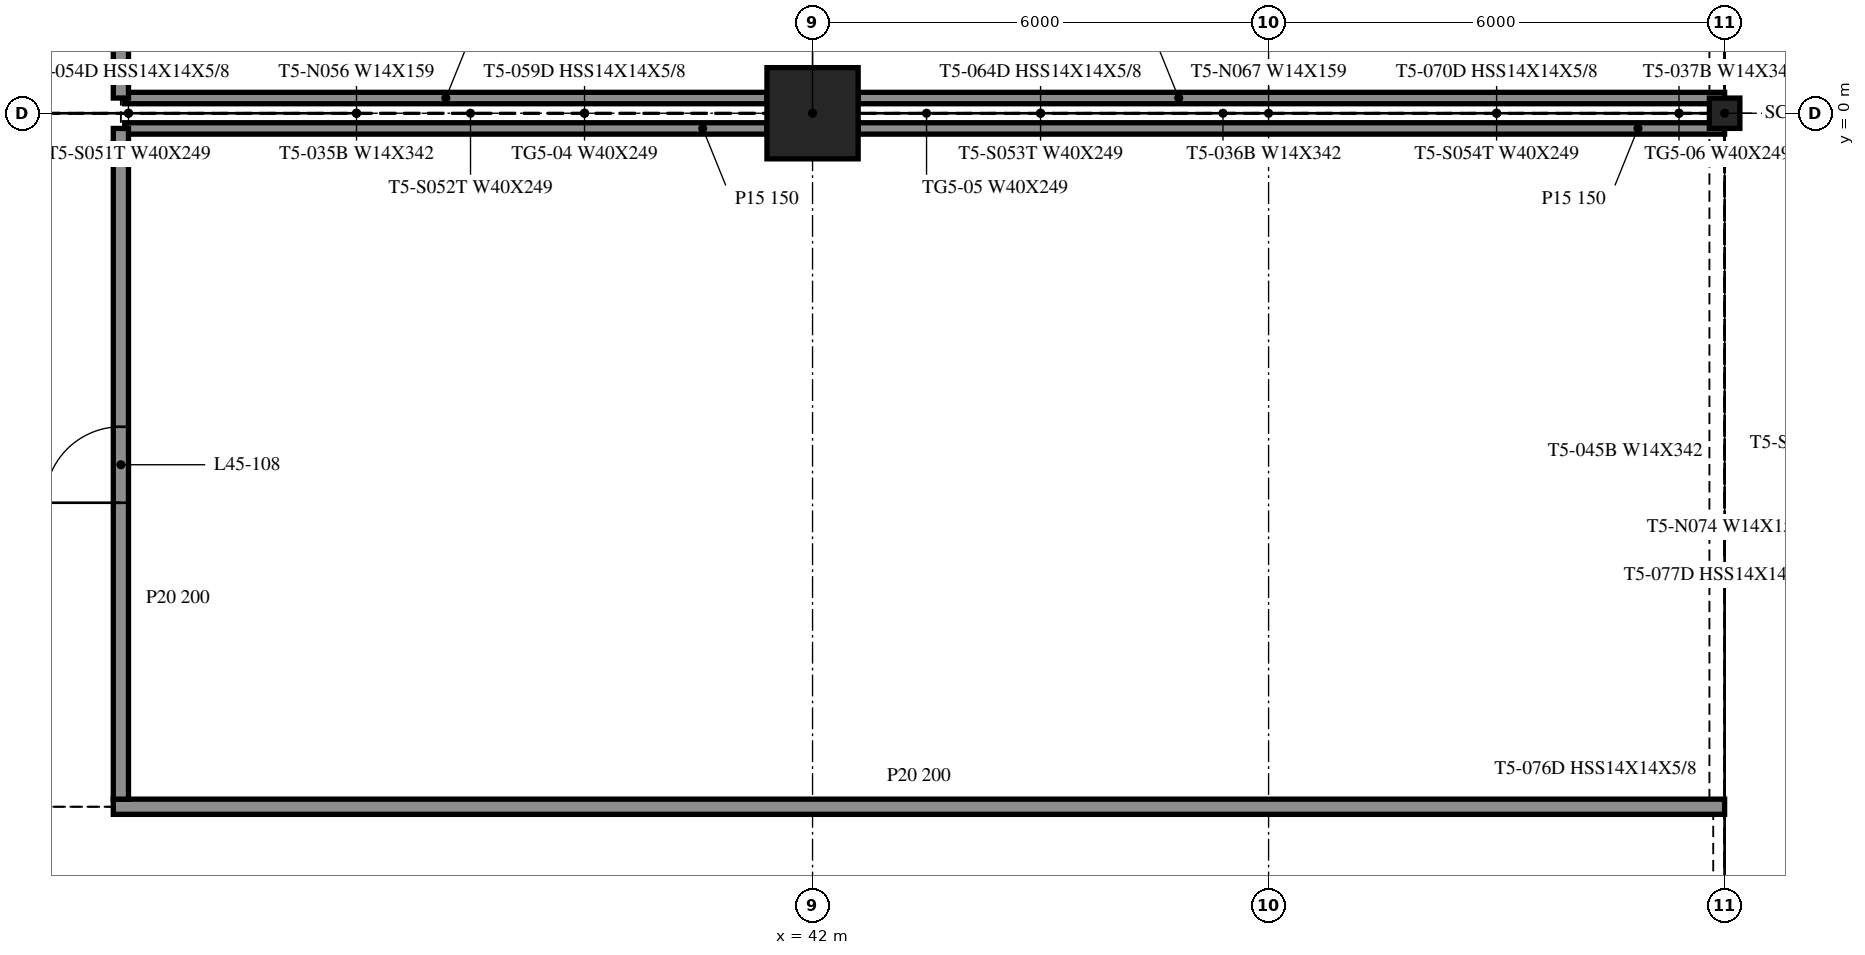
"""IFC4 building model, lengths in metres.
Left out: names, types, materials, properties, quantities, classifications, styles, units other than length and angle.
Written with IfcOpenShell. Run it as: python <this file> out.ifc"""

import sys

from ifc_helpers import new_model, si_unit, direction, frame, frame_2d, origin, origin_2d, place, context, subcontext, project, spatial, rectangle, i_section, extrude, element, fill, save


model = new_model("IFC4")
c1 = context("Model", 3, precision=1e-05, world=origin(), true_north=direction((0.0, 1.0)))
c2 = subcontext(c1, "Body", "Model", "MODEL_VIEW")
j1 = project(units=[si_unit("LENGTHUNIT", "METRE"), si_unit("PLANEANGLEUNIT", "RADIAN")], contexts=[c1])
p1 = place(None, origin())
s1 = spatial("IfcSite", under=j1, at=p1, CompositionType="ELEMENT")
p2 = place(p1, origin())
s2 = spatial("IfcBuilding", under=s1, at=p2, CompositionType="ELEMENT")
p3 = place(p2, frame((0.0, 0.0, 189.6)))
s3 = spatial("IfcBuildingStorey", under=s2, at=p3, CompositionType="ELEMENT", Elevation=189.6)
p4 = place(p3, frame((42.0, 0.0, -0.4), z_axis=(0.0, 0.0, 1.0), x_axis=(1.0, 0.0, 0.0)))
e1 = element("IfcColumn", 1, at=p4, inside=s3, PredefinedType="COLUMN", context=c2, shape_type="SweptSolid", body=[
    extrude(rectangle(XDim=1.2, YDim=1.2, at=origin_2d()), origin(), (0.0, 0.0, 1.0), 4.36),
])
p5 = place(p3, frame((54.0, 0.0, -0.4), z_axis=(0.0, 0.0, 1.0), x_axis=(1.0, 0.0, 0.0)))
e2 = element("IfcColumn", 2, at=p5, inside=s3, PredefinedType="COLUMN", context=c2, shape_type="SweptSolid", body=[
    extrude(i_section(OverallWidth=0.401, OverallDepth=0.399, WebThickness=0.025, FlangeThickness=0.04, at=origin_2d()), origin(), (0.0, 0.0, 1.0), 4.36),
])
p6 = place(p3, frame((32.8, -9.125, 0.0), z_axis=(0.0, 0.0, 1.0), x_axis=(1.0, 0.0, 0.0)))
e3 = element("IfcWall", 3, at=p6, inside=s3, PredefinedType="PARTITIONING", context=c2, shape_type="SweptSolid", body=[
    extrude(rectangle(XDim=21.2, YDim=0.2, at=frame_2d((10.6, 0.0))), origin(), (0.0, 0.0, 1.0), 3.96),
])
p7 = place(p3, frame((32.95, -0.2, 0.0), z_axis=(0.0, 0.0, 1.0), x_axis=(1.0, 0.0, 0.0)))
e4 = element("IfcWall", 4, at=p7, inside=s3, PredefinedType="PARTITIONING", context=c2, shape_type="SweptSolid", body=[
    extrude(rectangle(XDim=8.45, YDim=0.15, at=frame_2d((4.225, 0.0))), origin(), (0.0, 0.0, 1.0), 3.96),
])
p8 = place(p3, frame((42.6, -0.2, 0.0), z_axis=(0.0, 0.0, 1.0), x_axis=(1.0, 0.0, 0.0)))
e5 = element("IfcWall", 5, at=p8, inside=s3, PredefinedType="PARTITIONING", context=c2, shape_type="SweptSolid", body=[
    extrude(rectangle(XDim=11.4, YDim=0.15, at=frame_2d((5.7, 0.0))), origin(), (0.0, 0.0, 1.0), 3.96),
])
p9 = place(p3, frame((32.95, 0.2, 0.0), z_axis=(0.0, 0.0, 1.0), x_axis=(1.0, 0.0, 0.0)))
e6 = element("IfcWall", 6, at=p9, inside=s3, PredefinedType="PARTITIONING", context=c2, shape_type="SweptSolid", body=[
    extrude(rectangle(XDim=8.45, YDim=0.15, at=frame_2d((4.225, 0.0))), origin(), (0.0, 0.0, 1.0), 3.96),
])
p10 = place(p3, frame((42.6, 0.2, 0.0), z_axis=(0.0, 0.0, 1.0), x_axis=(1.0, 0.0, 0.0)))
e7 = element("IfcWall", 7, at=p10, inside=s3, PredefinedType="PARTITIONING", context=c2, shape_type="SweptSolid", body=[
    extrude(rectangle(XDim=11.4, YDim=0.15, at=frame_2d((5.7, 0.0))), origin(), (0.0, 0.0, 1.0), 3.96),
])
p11 = place(p3, frame((32.9, -9.025, 0.0), z_axis=(0.0, 0.0, 1.0), x_axis=(0.0, 1.0, 0.0)))
e8 = element("IfcWall", 8, at=p11, inside=s3, PredefinedType="PARTITIONING", context=c2, shape_type="SweptSolid", body=[
    extrude(rectangle(XDim=8.825, YDim=0.2, at=frame_2d((4.413, 0.0))), origin(), (0.0, 0.0, 1.0), 3.96),
])
p12 = place(p11, frame((3.9, 0.0, 0.0)))
e9 = element("IfcOpeningElement", 9, at=p12, cuts=e8, PredefinedType="OPENING", context=c2, shape_type="SweptSolid", body=[
    extrude(rectangle(XDim=1.0, YDim=2.1, at=frame_2d((0.5, 1.05))), frame((0.0, 0.11, 0.0), z_axis=(0.0, -1.0, 0.0), x_axis=(1.0, 0.0, 0.0)), (0.0, 0.0, 1.0), 0.22),
])
p13 = place(p3, frame((32.9, 0.2, 0.0), z_axis=(0.0, 0.0, 1.0), x_axis=(0.0, 1.0, 0.0)))
e10 = element("IfcWall", 10, at=p13, inside=s3, PredefinedType="PARTITIONING", context=c2, shape_type="SweptSolid", body=[
    extrude(rectangle(XDim=11.1, YDim=0.2, at=frame_2d((5.55, 0.0))), origin(), (0.0, 0.0, 1.0), 3.96),
])
p14 = place(p13, frame((4.9, 0.0, 0.0)))
e11 = element("IfcOpeningElement", 11, at=p14, cuts=e10, PredefinedType="OPENING", context=c2, shape_type="SweptSolid", body=[
    extrude(rectangle(XDim=1.2, YDim=2.1, at=frame_2d((0.6, 1.05))), frame((0.0, 0.11, 0.0), z_axis=(0.0, -1.0, 0.0), x_axis=(1.0, 0.0, 0.0)), (0.0, 0.0, 1.0), 0.22),
])
p15 = place(p12, origin())
e12 = element("IfcDoor", 12, at=p15, inside=s3, OperationType="SINGLE_SWING_RIGHT", PredefinedType="DOOR", context=c2, shape_type="SweptSolid", body=[
    extrude(rectangle(XDim=1.0, YDim=2.1, at=frame_2d((0.5, 1.05))), frame((0.0, 0.025, 0.0), z_axis=(0.0, -1.0, 0.0), x_axis=(1.0, 0.0, 0.0)), (0.0, 0.0, 1.0), 0.05),
])
fill(e9, e12)
save(model, sys.argv[1])
